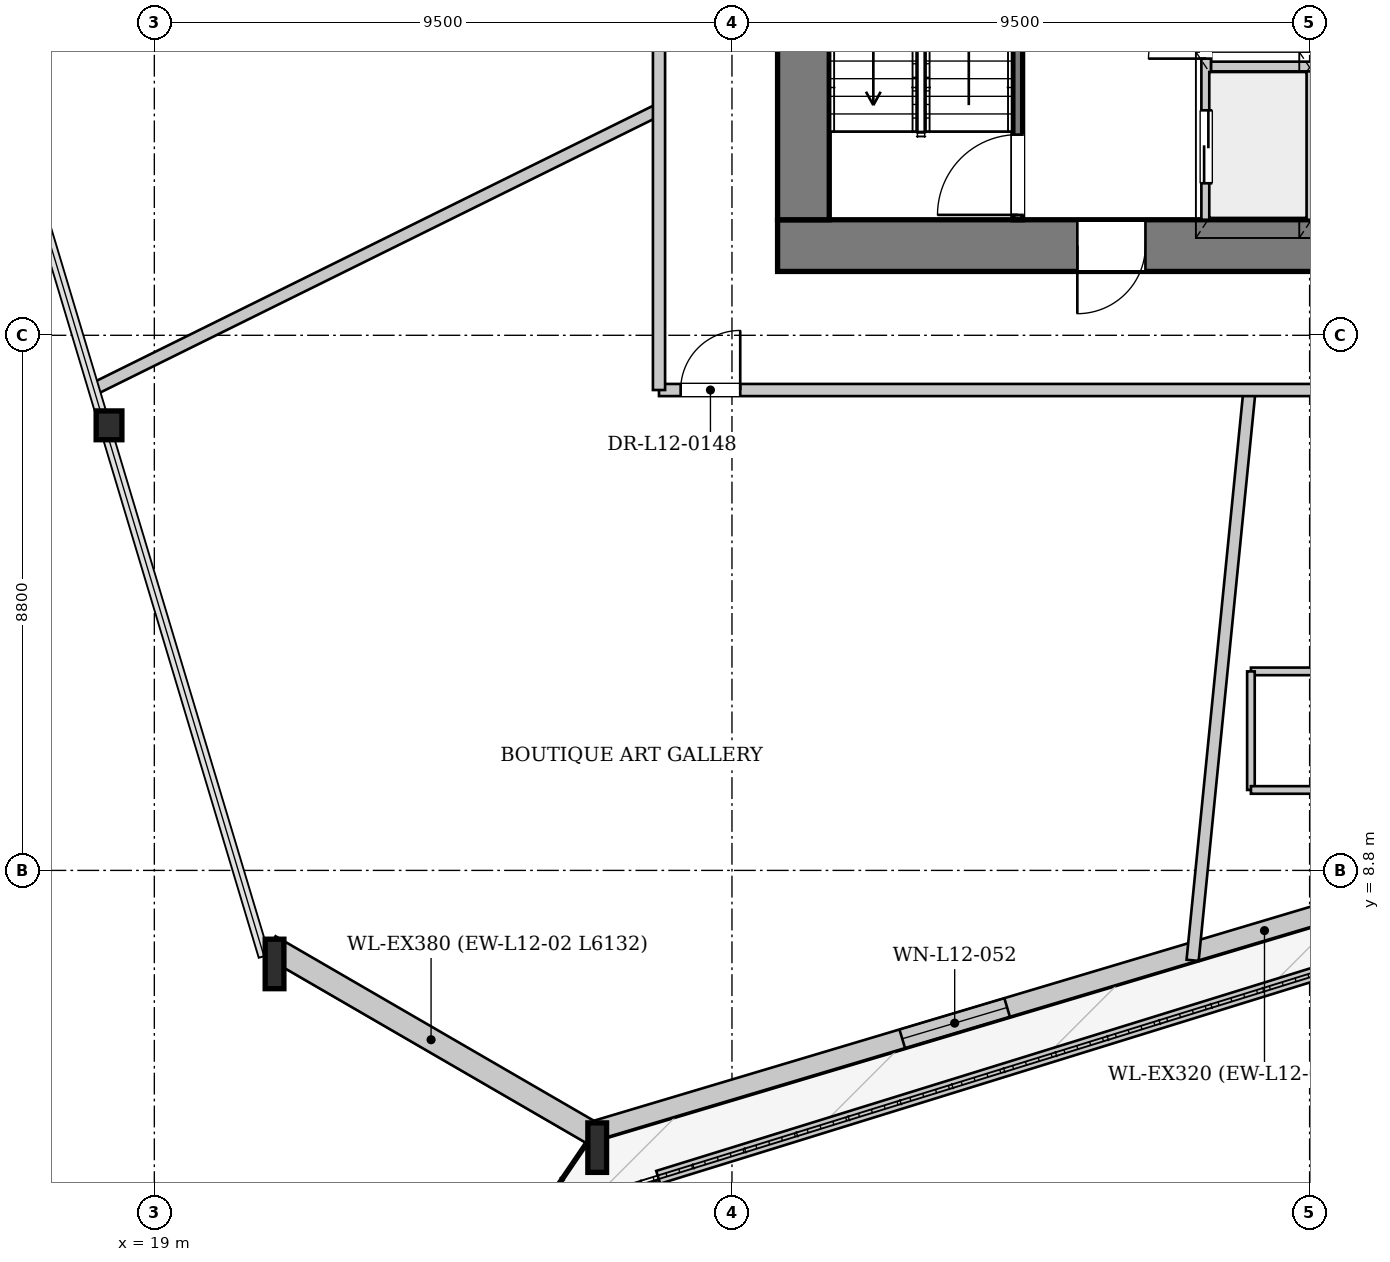
"""IFC4 building model, lengths in metres.
Left out: names, types, materials, properties, quantities, classifications, styles, units other than length and angle.
Written with IfcOpenShell. Run it as: python <this file> out.ifc"""

import sys

from ifc_helpers import new_model, si_unit, direction, frame, frame_2d, origin, origin_2d, place, context, subcontext, project, spatial, rectangle, i_section, extrude, source, transform, mapped, element, fill, save


model = new_model("IFC4")
c1 = context("Model", 3, precision=1e-05, world=origin(), true_north=direction((0.0, 1.0)))
c2 = subcontext(c1, "Body", "Model", "MODEL_VIEW")
j1 = project(units=[si_unit("LENGTHUNIT", "METRE"), si_unit("PLANEANGLEUNIT", "RADIAN")], contexts=[c1])
p1 = place(None, origin())
s1 = spatial("IfcSite", under=j1, at=p1, CompositionType="ELEMENT")
p2 = place(p1, origin())
s2 = spatial("IfcBuilding", under=s1, at=p2, CompositionType="ELEMENT")
p3 = place(p2, frame((0.0, 0.0, 50.6)))
s3 = spatial("IfcBuildingStorey", under=s2, at=p3, CompositionType="ELEMENT", Elevation=50.6)
m1 = source(origin(), c2, "Body", "SweptSolid", [
    extrude(i_section(OverallWidth=0.424, OverallDepth=0.474, WebThickness=0.043, FlangeThickness=0.068, at=origin_2d()), origin(), (0.0, 0.0, 1.0), 3.406),
])
p4 = place(p3, frame((18.138, 16.27, 0.0), z_axis=(0.068448115891, -0.08815830633, 0.993751965259), x_axis=(0.789870612442, 0.613273524294, 0.0)))
e1 = element("IfcColumn", 1, at=p4, inside=s3, PredefinedType="COLUMN", context=c2, shape_type="MappedRepresentation", body=[
    mapped(m1, transform((0.0, 0.0, 0.0), x_axis=(1.0, 0.0, 0.0), y_axis=(0.0, 1.0, 0.0), z_axis=(0.0, 0.0, 1.0), scale=1.0)),
])
m2 = source(origin(), c2, "Body", "SweptSolid", [
    extrude(i_section(OverallWidth=0.308, OverallDepth=0.814, WebThickness=0.021, FlangeThickness=0.04, at=origin_2d()), origin(), (0.0, 0.0, 1.0), 3.412),
])
p5 = place(p3, frame((20.803, 7.389, 0.0), z_axis=(0.10167156873, -0.074411281829, 0.992031175543), x_axis=(0.59060020099, 0.806964313084, 0.0)))
e2 = element("IfcColumn", 2, at=p5, inside=s3, PredefinedType="COLUMN", context=c2, shape_type="MappedRepresentation", body=[
    mapped(m2, transform((0.0, 0.0, 0.0), x_axis=(1.0, 0.0, 0.0), y_axis=(0.0, 1.0, 0.0), z_axis=(0.0, 0.0, 1.0), scale=1.0)),
])
m3 = source(origin(), c2, "Body", "SweptSolid", [
    extrude(i_section(OverallWidth=0.308, OverallDepth=0.814, WebThickness=0.021, FlangeThickness=0.04, at=origin_2d()), origin(), (0.0, 0.0, 1.0), 3.406),
])
p6 = place(p3, frame((26.109, 4.313, 0.0), z_axis=(0.102783523705, -0.042647277967, 0.993789090772), x_axis=(0.383242900224, 0.923647594826, 0.0)))
e3 = element("IfcColumn", 3, at=p6, inside=s3, PredefinedType="COLUMN", context=c2, shape_type="MappedRepresentation", body=[
    mapped(m3, transform((0.0, 0.0, 0.0), x_axis=(1.0, 0.0, 0.0), y_axis=(0.0, 1.0, 0.0), z_axis=(0.0, 0.0, 1.0), scale=1.0)),
])
p7 = place(p3, frame((49.526, 11.474, 0.0), z_axis=(0.0, 0.0, 1.0), x_axis=(-0.958183644485, -0.286153985541, 0.0)))
e4 = element("IfcWall", 4, at=p7, inside=s3, PredefinedType="SOLIDWALL", context=c2, shape_type="SweptSolid", body=[
    extrude(rectangle(XDim=24.487, YDim=0.32, at=frame_2d((12.244, 0.0))), origin(), (0.0, 0.0, 1.0), 2.592),
])
p8 = place(p7, frame((7.286, 0.0, 0.0)))
e5 = element("IfcOpeningElement", 5, at=p8, cuts=e4, PredefinedType="OPENING", context=c2, shape_type="SweptSolid", body=[
    extrude(rectangle(XDim=1.1, YDim=2.3, at=frame_2d((0.55, 1.15))), frame((0.0, 0.17, 0.0), z_axis=(0.0, -1.0, 0.0), x_axis=(1.0, 0.0, 0.0)), (0.0, 0.0, 1.0), 0.34),
])
p9 = place(p7, frame((17.221, 0.0, 0.272)))
e6 = element("IfcOpeningElement", 6, at=p9, cuts=e4, PredefinedType="OPENING", context=c2, shape_type="SweptSolid", body=[
    extrude(rectangle(XDim=1.8, YDim=2.2, at=frame_2d((0.9, 1.1))), frame((0.0, 0.17, 0.0), z_axis=(0.0, -1.0, 0.0), x_axis=(1.0, 0.0, 0.0)), (0.0, 0.0, 1.0), 0.34),
])
p10 = place(p3, frame((26.204, 4.478, 0.0), z_axis=(0.0, 0.0, 1.0), x_axis=(-0.865169041167, 0.501480338803, 0.0)))
e7 = element("IfcWall", 7, at=p10, inside=s3, PredefinedType="SOLIDWALL", context=c2, shape_type="SweptSolid", body=[
    extrude(rectangle(XDim=6.132, YDim=0.38, at=frame_2d((3.066, 0.0))), origin(), (0.0, 0.0, 1.0), 2.592),
])
p11 = place(p3, frame((27.287, 3.753, 0.0), z_axis=(0.0, 0.0, 1.0), x_axis=(0.95522578955, 0.295877831173, 0.0)))
e8 = element("IfcWall", 8, at=p11, inside=s3, PredefinedType="PARAPET", context=c2, shape_type="SweptSolid", body=[
    extrude(rectangle(XDim=21.726, YDim=0.22, at=frame_2d((10.863, 0.0))), origin(), (0.0, 0.0, 1.0), 0.3),
])
p12 = place(p3, frame((46.75, 19.075, 0.0), z_axis=(0.0, 0.0, 1.0), x_axis=(-1.0, 0.0, 0.0)))
e9 = element("IfcWall", 9, at=p12, inside=s3, PredefinedType="SHEAR", context=c2, shape_type="SweptSolid", body=[
    extrude(rectangle(XDim=17.5, YDim=0.85, at=frame_2d((8.75, 0.0))), origin(), (0.0, 0.0, 1.0), 3.3),
])
p13 = place(p12, frame((4.95, 0.0, 0.0)))
e10 = element("IfcOpeningElement", 10, at=p13, cuts=e9, PredefinedType="OPENING", context=c2, shape_type="SweptSolid", body=[
    extrude(rectangle(XDim=1.12, YDim=2.25, at=frame_2d((0.56, 1.125))), frame((0.0, 0.435, 0.0), z_axis=(0.0, -1.0, 0.0), x_axis=(1.0, 0.0, 0.0)), (0.0, 0.0, 1.0), 0.87),
])
p14 = place(p12, frame((11.45, 0.0, 0.0)))
e11 = element("IfcOpeningElement", 11, at=p14, cuts=e9, PredefinedType="OPENING", context=c2, shape_type="SweptSolid", body=[
    extrude(rectangle(XDim=1.12, YDim=2.25, at=frame_2d((0.56, 1.125))), frame((0.0, 0.435, 0.0), z_axis=(0.0, -1.0, 0.0), x_axis=(1.0, 0.0, 0.0)), (0.0, 0.0, 1.0), 0.87),
])
p15 = place(p3, frame((29.675, 19.5, 0.0), z_axis=(0.0, 0.0, 1.0), x_axis=(0.0, 1.0, 0.0)))
e12 = element("IfcWall", 12, at=p15, inside=s3, PredefinedType="SHEAR", context=c2, shape_type="SweptSolid", body=[
    extrude(rectangle(XDim=14.2, YDim=0.85, at=frame_2d((7.1, 0.0))), origin(), (0.0, 0.0, 1.0), 3.3),
])
p16 = place(p15, frame((7.42, 0.0, 0.0)))
e13 = element("IfcOpeningElement", 13, at=p16, cuts=e12, PredefinedType="OPENING", context=c2, shape_type="SweptSolid", body=[
    extrude(rectangle(XDim=1.6, YDim=2.2, at=frame_2d((0.8, 1.1))), frame((0.0, 0.435, 0.0), z_axis=(0.0, -1.0, 0.0), x_axis=(1.0, 0.0, 0.0)), (0.0, 0.0, 1.0), 0.87),
])
p17 = place(p3, frame((33.2, 19.5, 0.0), z_axis=(0.0, 0.0, 1.0), x_axis=(0.0, 1.0, 0.0)))
e14 = element("IfcWall", 14, at=p17, inside=s3, PredefinedType="PARTITIONING", context=c2, shape_type="SweptSolid", body=[
    extrude(rectangle(XDim=7.46, YDim=0.16, at=frame_2d((3.73, 0.0))), origin(), (0.0, 0.0, 1.0), 3.3),
])
p18 = place(p17, frame((0.08, 0.0, 0.0)))
e15 = element("IfcOpeningElement", 15, at=p18, cuts=e14, PredefinedType="OPENING", context=c2, shape_type="SweptSolid", body=[
    extrude(rectangle(XDim=1.32, YDim=2.2, at=frame_2d((0.66, 1.1))), frame((0.0, 0.09, 0.0), z_axis=(0.0, -1.0, 0.0), x_axis=(1.0, 0.0, 0.0)), (0.0, 0.0, 1.0), 0.18),
])
p19 = place(p3, frame((36.3, 19.5, 0.0), z_axis=(0.0, 0.0, 1.0), x_axis=(0.0, 1.0, 0.0)))
e16 = element("IfcWall", 16, at=p19, inside=s3, PredefinedType="PARTITIONING", context=c2, shape_type="SweptSolid", body=[
    extrude(rectangle(XDim=4.78, YDim=0.16, at=frame_2d((2.39, 0.0))), origin(), (0.0, 0.0, 1.0), 3.3),
])
p20 = place(p19, frame((0.6, 0.0, 0.0)))
e17 = element("IfcOpeningElement", 17, at=p20, cuts=e16, PredefinedType="OPENING", context=c2, shape_type="SweptSolid", body=[
    extrude(rectangle(XDim=1.2, YDim=2.2, at=frame_2d((0.6, 1.1))), frame((0.0, 0.09, 0.0), z_axis=(0.0, -1.0, 0.0), x_axis=(1.0, 0.0, 0.0)), (0.0, 0.0, 1.0), 0.18),
])
p21 = place(p19, frame((2.65, 0.0, 0.0)))
e18 = element("IfcOpeningElement", 18, at=p21, cuts=e16, PredefinedType="OPENING", context=c2, shape_type="SweptSolid", body=[
    extrude(rectangle(XDim=0.95, YDim=2.1, at=frame_2d((0.475, 1.05))), frame((0.0, 0.09, 0.0), z_axis=(0.0, -1.0, 0.0), x_axis=(1.0, 0.0, 0.0)), (0.0, 0.0, 1.0), 0.18),
])
p22 = place(p3, frame((38.0, 19.5, 0.0), z_axis=(0.0, 0.0, 1.0), x_axis=(0.0, 1.0, 0.0)))
e19 = element("IfcWall", 19, at=p22, inside=s3, PredefinedType="PARTITIONING", context=c2, shape_type="SweptSolid", body=[
    extrude(rectangle(XDim=2.46, YDim=0.125, at=frame_2d((1.23, 0.0))), origin(), (0.0, 0.0, 1.0), 3.3),
])
p23 = place(p3, frame((36.38, 22.02, 0.0), z_axis=(0.0, 0.0, 1.0), x_axis=(1.0, 0.0, 0.0)))
e20 = element("IfcWall", 20, at=p23, inside=s3, PredefinedType="PARTITIONING", context=c2, shape_type="SweptSolid", body=[
    extrude(rectangle(XDim=3.24, YDim=0.16, at=frame_2d((1.62, 0.0))), origin(), (0.0, 0.0, 1.0), 3.3),
])
p24 = place(p3, frame((27.3, 21.312, 0.0), z_axis=(0.0, 0.0, 1.0), x_axis=(-0.896486110775, -0.443071837502, 0.0)))
e21 = element("IfcWall", 21, at=p24, inside=s3, PredefinedType="PARTITIONING", context=c2, shape_type="SweptSolid", body=[
    extrude(rectangle(XDim=10.339, YDim=0.2, at=frame_2d((5.17, 0.0))), origin(), (0.0, 0.0, 1.0), 3.3),
])
p25 = place(p3, frame((37.012, 16.7, 0.0), z_axis=(0.0, 0.0, 1.0), x_axis=(-0.099311369571, -0.995056406378, 0.0)))
e22 = element("IfcWall", 22, at=p25, inside=s3, PredefinedType="PARTITIONING", context=c2, shape_type="SweptSolid", body=[
    extrude(rectangle(XDim=9.425, YDim=0.2, at=frame_2d((4.713, 0.0))), origin(), (0.0, 0.0, 1.0), 3.3),
])
p26 = place(p3, frame((39.435, 12.073, 0.0), z_axis=(0.0, 0.0, 1.0), x_axis=(-1.0, 0.0, 0.0)))
e23 = element("IfcWall", 23, at=p26, inside=s3, PredefinedType="PARTITIONING", context=c2, shape_type="SweptSolid", body=[
    extrude(rectangle(XDim=2.4, YDim=0.125, at=frame_2d((1.2, 0.0))), origin(), (0.0, 0.0, 1.0), 3.045),
])
p27 = place(p3, frame((37.035, 12.073, 0.0), z_axis=(0.0, 0.0, 1.0), x_axis=(0.0, -1.0, 0.0)))
e24 = element("IfcWall", 24, at=p27, inside=s3, PredefinedType="PARTITIONING", context=c2, shape_type="SweptSolid", body=[
    extrude(rectangle(XDim=1.95, YDim=0.125, at=frame_2d((0.975, 0.0))), origin(), (0.0, 0.0, 1.0), 3.3),
])
p28 = place(p3, frame((37.035, 10.123, 0.0), z_axis=(0.0, 0.0, 1.0), x_axis=(1.0, 0.0, 0.0)))
e25 = element("IfcWall", 25, at=p28, inside=s3, PredefinedType="PARTITIONING", context=c2, shape_type="SweptSolid", body=[
    extrude(rectangle(XDim=2.4, YDim=0.125, at=frame_2d((1.2, 0.0))), origin(), (0.0, 0.0, 1.0), 3.3),
])
p29 = place(p3, frame((27.3, 16.7, 0.0), z_axis=(0.0, 0.0, 1.0), x_axis=(1.0, 0.0, 0.0)))
e26 = element("IfcWall", 26, at=p29, inside=s3, PredefinedType="PARTITIONING", context=c2, shape_type="SweptSolid", body=[
    extrude(rectangle(XDim=21.4, YDim=0.2, at=frame_2d((10.7, 0.0))), origin(), (0.0, 0.0, 1.0), 3.3),
])
p30 = place(p29, frame((20.12, 0.0, 0.0)))
e27 = element("IfcOpeningElement", 27, at=p30, cuts=e26, PredefinedType="OPENING", context=c2, shape_type="SweptSolid", body=[
    extrude(rectangle(XDim=0.98, YDim=2.15, at=frame_2d((0.49, 1.075))), frame((0.0, 0.11, 0.0), z_axis=(0.0, -1.0, 0.0), x_axis=(1.0, 0.0, 0.0)), (0.0, 0.0, 1.0), 0.22),
])
p31 = place(p29, frame((0.356, 0.0, 0.0)))
e28 = element("IfcOpeningElement", 28, at=p31, cuts=e26, PredefinedType="OPENING", context=c2, shape_type="SweptSolid", body=[
    extrude(rectangle(XDim=0.98, YDim=2.15, at=frame_2d((0.49, 1.075))), frame((0.0, 0.11, 0.0), z_axis=(0.0, -1.0, 0.0), x_axis=(1.0, 0.0, 0.0)), (0.0, 0.0, 1.0), 0.22),
])
p32 = place(p29, frame((14.236, 0.0, 0.0)))
e29 = element("IfcOpeningElement", 29, at=p32, cuts=e26, PredefinedType="OPENING", context=c2, shape_type="SweptSolid", body=[
    extrude(rectangle(XDim=0.98, YDim=2.15, at=frame_2d((0.49, 1.075))), frame((0.0, 0.11, 0.0), z_axis=(0.0, -1.0, 0.0), x_axis=(1.0, 0.0, 0.0)), (0.0, 0.0, 1.0), 0.22),
])
p33 = place(p3, frame((27.3, 16.7, 0.0), z_axis=(0.0, 0.0, 1.0), x_axis=(0.0, 1.0, 0.0)))
e30 = element("IfcWall", 30, at=p33, inside=s3, PredefinedType="PARTITIONING", context=c2, shape_type="SweptSolid", body=[
    extrude(rectangle(XDim=19.8, YDim=0.2, at=frame_2d((9.9, 0.0))), origin(), (0.0, 0.0, 1.0), 3.3),
])
p34 = place(p33, frame((18.52, 0.0, 0.0)))
e31 = element("IfcOpeningElement", 31, at=p34, cuts=e30, PredefinedType="OPENING", context=c2, shape_type="SweptSolid", body=[
    extrude(rectangle(XDim=0.98, YDim=2.15, at=frame_2d((0.49, 1.075))), frame((0.0, 0.11, 0.0), z_axis=(0.0, -1.0, 0.0), x_axis=(1.0, 0.0, 0.0)), (0.0, 0.0, 1.0), 0.22),
])
p35 = place(p33, frame((12.028, 0.0, 0.0)))
e32 = element("IfcOpeningElement", 32, at=p35, cuts=e30, PredefinedType="OPENING", context=c2, shape_type="SweptSolid", body=[
    extrude(rectangle(XDim=0.98, YDim=2.15, at=frame_2d((0.49, 1.075))), frame((0.0, 0.11, 0.0), z_axis=(0.0, -1.0, 0.0), x_axis=(1.0, 0.0, 0.0)), (0.0, 0.0, 1.0), 0.22),
])
m4 = source(origin(), c2, "Body", "SweptSolid", [
    extrude(rectangle(XDim=1.8, YDim=2.2, at=frame_2d((0.9, 1.1))), frame((0.0, 0.03, 0.0), z_axis=(0.0, -1.0, 0.0), x_axis=(1.0, 0.0, 0.0)), (0.0, 0.0, 1.0), 0.06),
])
p36 = place(p9, origin())
e33 = element("IfcWindow", 33, at=p36, inside=s3, PartitioningType="SINGLE_PANEL", PredefinedType="WINDOW", context=c2, shape_type="MappedRepresentation", body=[
    mapped(m4, transform((0.0, 0.0, 0.0), x_axis=(1.0, 0.0, 0.0), y_axis=(0.0, 1.0, 0.0), z_axis=(0.0, 0.0, 1.0), scale=1.0)),
])
fill(e6, e33)
m5 = source(origin(), c2, "Body", "SweptSolid", [
    extrude(rectangle(XDim=1.12, YDim=2.25, at=frame_2d((0.56, 1.125))), frame((0.0, 0.025, 0.0), z_axis=(0.0, -1.0, 0.0), x_axis=(1.0, 0.0, 0.0)), (0.0, 0.0, 1.0), 0.05),
])
p37 = place(p14, origin())
e34 = element("IfcDoor", 34, at=p37, inside=s3, OperationType="SINGLE_SWING_RIGHT", PredefinedType="DOOR", context=c2, shape_type="MappedRepresentation", body=[
    mapped(m5, transform((0.0, 0.0, 0.0), x_axis=(1.0, 0.0, 0.0), y_axis=(0.0, 1.0, 0.0), z_axis=(0.0, 0.0, 1.0), scale=1.0)),
])
fill(e11, e34)
m6 = source(origin(), c2, "Body", "SweptSolid", [
    extrude(rectangle(XDim=1.32, YDim=2.2, at=frame_2d((0.66, 1.1))), frame((0.0, 0.025, 0.0), z_axis=(0.0, -1.0, 0.0), x_axis=(1.0, 0.0, 0.0)), (0.0, 0.0, 1.0), 0.05),
])
p38 = place(p18, origin())
e35 = element("IfcDoor", 35, at=p38, inside=s3, OperationType="SINGLE_SWING_LEFT", PredefinedType="DOOR", context=c2, shape_type="MappedRepresentation", body=[
    mapped(m6, transform((0.0, 0.0, 0.0), x_axis=(1.0, 0.0, 0.0), y_axis=(0.0, 1.0, 0.0), z_axis=(0.0, 0.0, 1.0), scale=1.0)),
])
fill(e15, e35)
m7 = source(origin(), c2, "Body", "SweptSolid", [
    extrude(rectangle(XDim=1.2, YDim=2.2, at=frame_2d((0.6, 1.1))), frame((0.0, 0.025, 0.0), z_axis=(0.0, -1.0, 0.0), x_axis=(1.0, 0.0, 0.0)), (0.0, 0.0, 1.0), 0.05),
])
p39 = place(p20, origin())
e36 = element("IfcDoor", 36, at=p39, inside=s3, OperationType="DOUBLE_DOOR_SLIDING", PredefinedType="DOOR", context=c2, shape_type="MappedRepresentation", body=[
    mapped(m7, transform((0.0, 0.0, 0.0), x_axis=(1.0, 0.0, 0.0), y_axis=(0.0, 1.0, 0.0), z_axis=(0.0, 0.0, 1.0), scale=1.0)),
])
fill(e17, e36)
m8 = source(origin(), c2, "Body", "SweptSolid", [
    extrude(rectangle(XDim=0.95, YDim=2.1, at=frame_2d((0.475, 1.05))), frame((0.0, 0.025, 0.0), z_axis=(0.0, -1.0, 0.0), x_axis=(1.0, 0.0, 0.0)), (0.0, 0.0, 1.0), 0.05),
])
p40 = place(p21, origin())
e37 = element("IfcDoor", 37, at=p40, inside=s3, OperationType="SINGLE_SWING_LEFT", PredefinedType="DOOR", context=c2, shape_type="MappedRepresentation", body=[
    mapped(m8, transform((0.0, 0.0, 0.0), x_axis=(1.0, 0.0, 0.0), y_axis=(0.0, 1.0, 0.0), z_axis=(0.0, 0.0, 1.0), scale=1.0)),
])
fill(e18, e37)
m9 = source(origin(), c2, "Body", "SweptSolid", [
    extrude(rectangle(XDim=0.98, YDim=2.15, at=frame_2d((0.49, 1.075))), frame((0.0, 0.025, 0.0), z_axis=(0.0, -1.0, 0.0), x_axis=(1.0, 0.0, 0.0)), (0.0, 0.0, 1.0), 0.05),
])
p41 = place(p31, origin())
e38 = element("IfcDoor", 38, at=p41, inside=s3, OperationType="SINGLE_SWING_RIGHT", PredefinedType="DOOR", context=c2, shape_type="MappedRepresentation", body=[
    mapped(m9, transform((0.0, 0.0, 0.0), x_axis=(1.0, 0.0, 0.0), y_axis=(0.0, 1.0, 0.0), z_axis=(0.0, 0.0, 1.0), scale=1.0)),
])
fill(e28, e38)
save(model, sys.argv[1])
